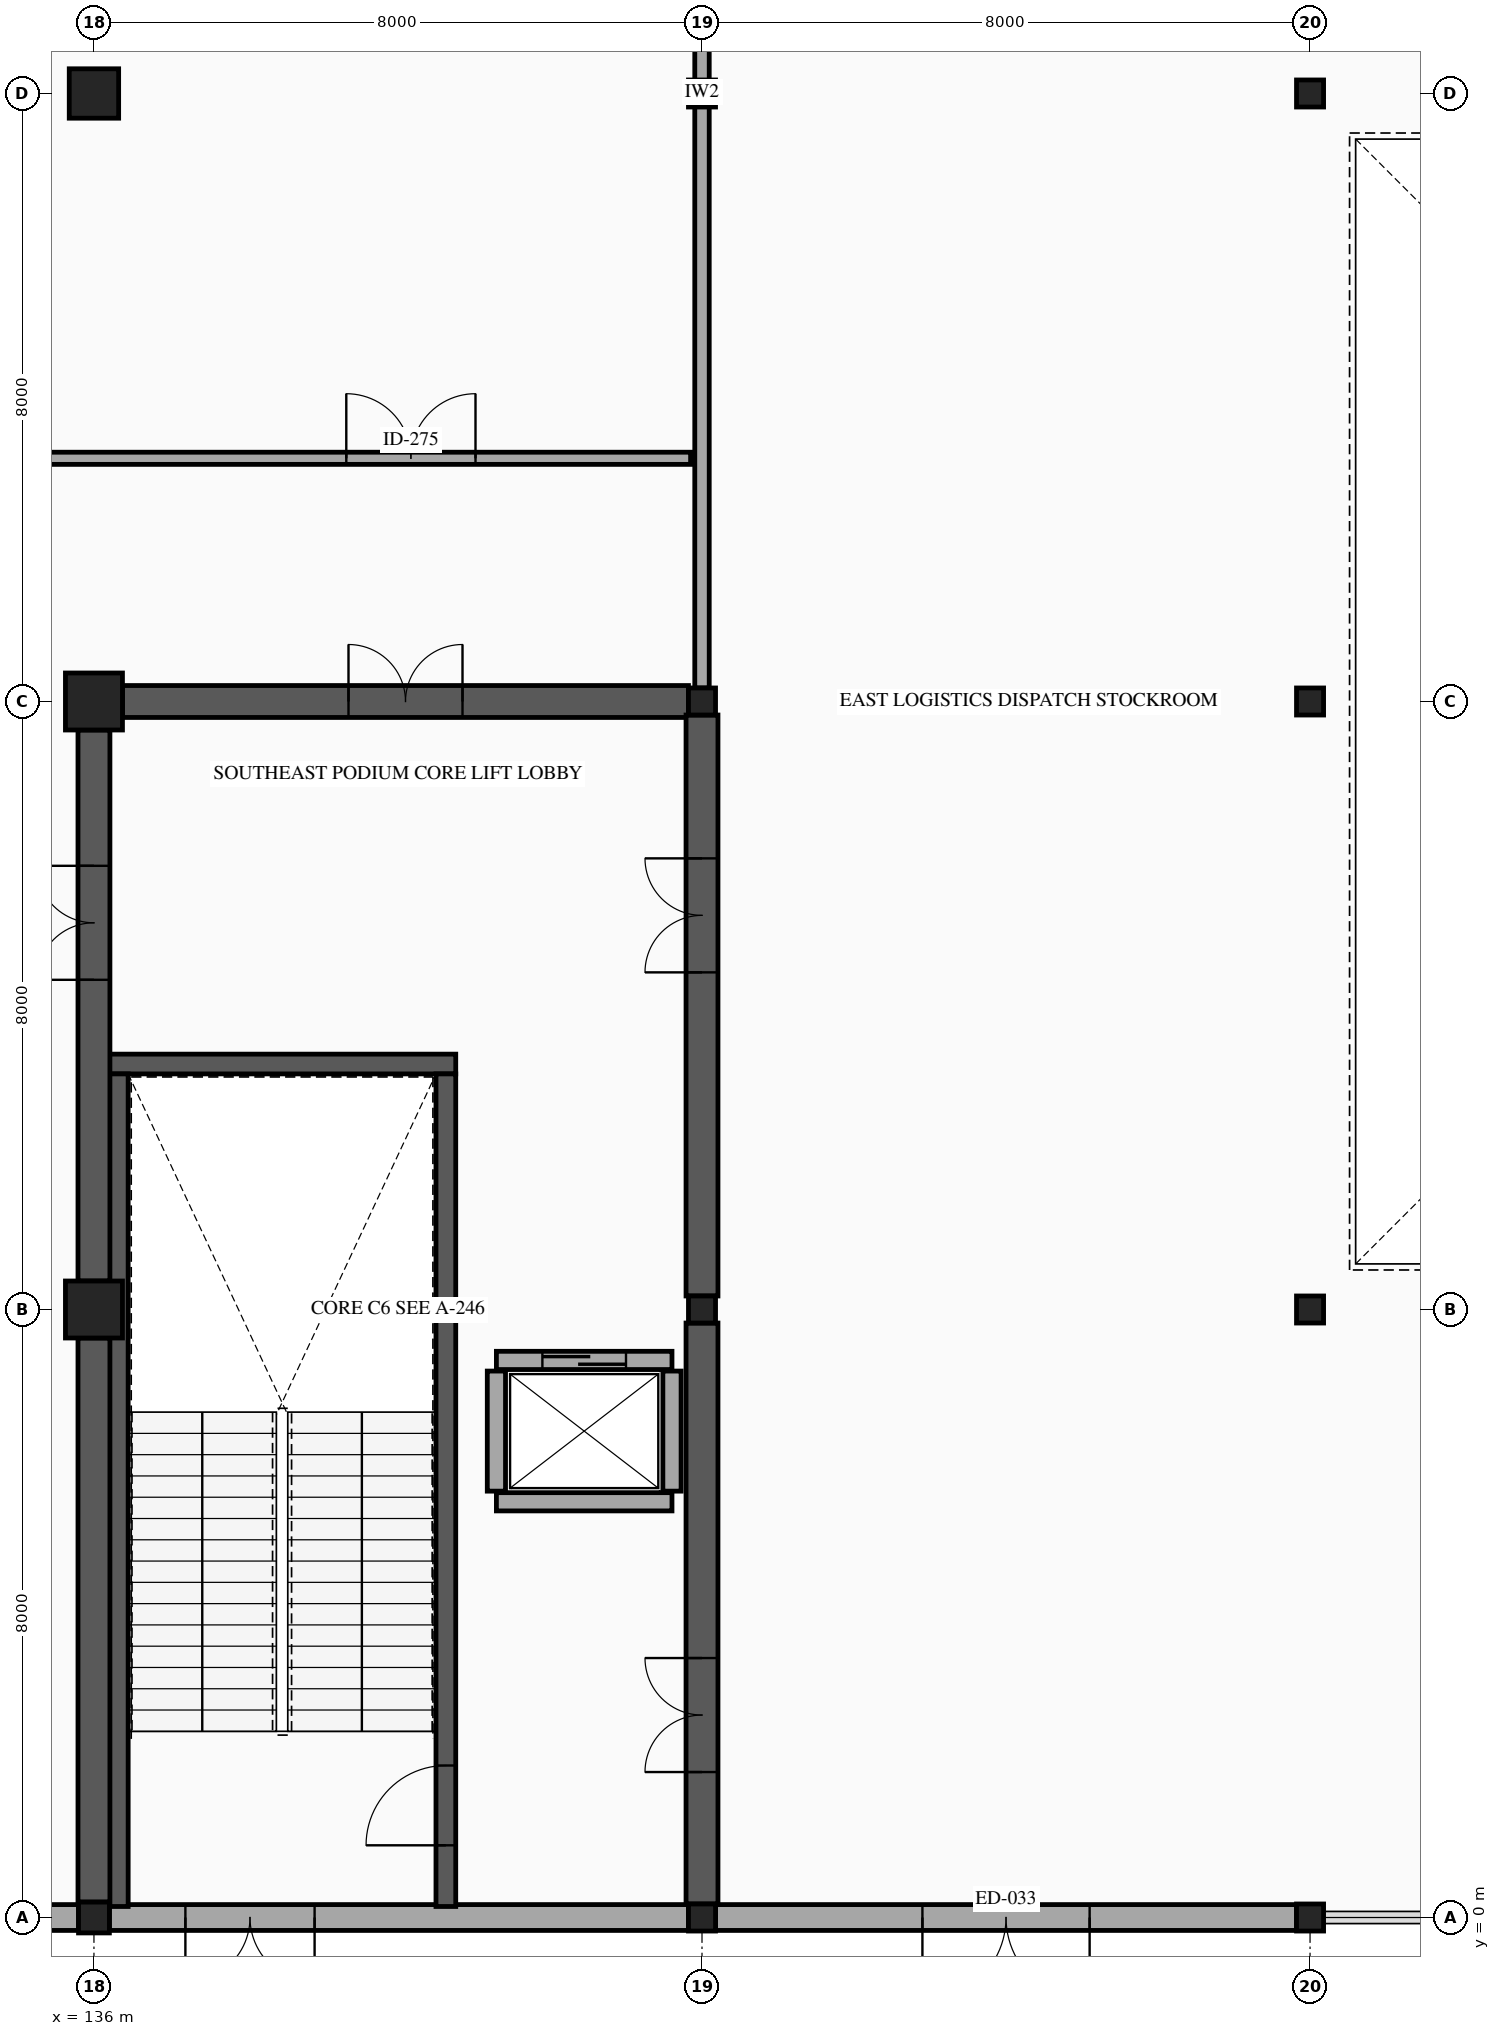
"""IFC4 building model, lengths in metres.
Left out: names, types, materials, properties, quantities, classifications, styles, units other than length and angle.
Written with IfcOpenShell. Run it as: python <this file> out.ifc"""

import sys

from ifc_helpers import new_model, si_unit, direction, frame, frame_2d, origin, origin_2d, place, context, subcontext, project, spatial, rectangle, hollow_rectangle, extrude, element, fill, save


model = new_model("IFC4")
c1 = context("Model", 3, precision=1e-05, world=origin(), true_north=direction((0.0, 1.0)))
c2 = subcontext(c1, "Body", "Model", "MODEL_VIEW")
j1 = project(units=[si_unit("LENGTHUNIT", "METRE"), si_unit("PLANEANGLEUNIT", "RADIAN")], contexts=[c1])
p1 = place(None, origin())
s1 = spatial("IfcSite", under=j1, at=p1, CompositionType="ELEMENT")
p2 = place(p1, origin())
s2 = spatial("IfcBuilding", under=s1, at=p2, CompositionType="ELEMENT")
p3 = place(p2, origin())
s3 = spatial("IfcBuildingStorey", under=s2, at=p3, CompositionType="ELEMENT", Elevation=0.0)
p4 = place(p3, frame((136.0, 0.0, 0.0), z_axis=(0.0, 0.0, 1.0), x_axis=(1.0, 0.0, 0.0)))
e1 = element("IfcColumn", 1, at=p4, inside=s3, PredefinedType="COLUMN", context=c2, shape_type="SweptSolid", body=[
    extrude(hollow_rectangle(XDim=0.406, YDim=0.406, WallThickness=0.015, InnerFilletRadius=0.015, OuterFilletRadius=0.029, at=origin_2d()), origin(), (0.0, 0.0, 1.0), 5.6),
])
for number, where, z_axis, x_axis in (
    (2, (136.0, 8.0, 0.0), (0.0, 0.0, 1.0), (1.0, 0.0, 0.0)),
    (3, (136.0, 16.0, 0.0), (0.0, 0.0, 1.0), (1.0, 0.0, 0.0)),
):
    element("IfcColumn", number, at=place(p3, frame(where, z_axis=z_axis, x_axis=x_axis)), inside=s3, PredefinedType="COLUMN", context=c2, shape_type="SweptSolid", body=[
        extrude(rectangle(XDim=0.75, YDim=0.75, at=origin_2d()), origin(), (0.0, 0.0, 1.0), 5.6),
    ])
p5 = place(p3, frame((136.0, 24.0, 0.0), z_axis=(0.0, 0.0, 1.0), x_axis=(1.0, 0.0, 0.0)))
e4 = element("IfcColumn", 4, at=p5, inside=s3, PredefinedType="COLUMN", context=c2, shape_type="SweptSolid", body=[
    extrude(rectangle(XDim=0.65, YDim=0.65, at=origin_2d()), origin(), (0.0, 0.0, 1.0), 5.6),
])
for number, where, z_axis, x_axis in (
    (5, (144.0, 0.0, 0.0), (0.0, 0.0, 1.0), (1.0, 0.0, 0.0)),
    (6, (144.0, 8.0, 0.0), (0.0, 0.0, 1.0), (1.0, 0.0, 0.0)),
    (7, (144.0, 16.0, 0.0), (0.0, 0.0, 1.0), (1.0, 0.0, 0.0)),
    (8, (144.0, 24.0, 0.0), (0.0, 0.0, 1.0), (1.0, 0.0, 0.0)),
    (9, (152.0, 0.0, 0.0), (0.0, 0.0, 1.0), (1.0, 0.0, 0.0)),
    (10, (152.0, 8.0, 0.0), (0.0, 0.0, 1.0), (1.0, 0.0, 0.0)),
    (11, (152.0, 16.0, 0.0), (0.0, 0.0, 1.0), (1.0, 0.0, 0.0)),
    (12, (152.0, 24.0, 0.0), (0.0, 0.0, 1.0), (1.0, 0.0, 0.0)),
):
    element("IfcColumn", number, at=place(p3, frame(where, z_axis=z_axis, x_axis=x_axis)), inside=s3, PredefinedType="COLUMN", context=c2, shape_type="SweptSolid", body=[
        extrude(hollow_rectangle(XDim=0.356, YDim=0.356, WallThickness=0.012, InnerFilletRadius=0.012, OuterFilletRadius=0.024, at=origin_2d()), origin(), (0.0, 0.0, 1.0), 5.6),
    ])
p6 = place(p3, frame((151.822, 0.0, 0.0), z_axis=(0.0, 0.0, 1.0), x_axis=(-1.0, 0.0, 0.0)))
e13 = element("IfcWall", 13, at=p6, inside=s3, PredefinedType="STANDARD", context=c2, shape_type="SweptSolid", body=[
    extrude(rectangle(XDim=7.644, YDim=0.34, at=frame_2d((3.822, 0.0))), origin(), (0.0, 0.0, 1.0), 4.58),
])
p7 = place(p6, frame((2.722, 0.0, 0.0)))
e14 = element("IfcOpeningElement", 14, at=p7, cuts=e13, PredefinedType="OPENING", context=c2, shape_type="SweptSolid", body=[
    extrude(rectangle(XDim=2.2, YDim=2.45, at=frame_2d((1.1, 1.225))), frame((0.0, 0.18, 0.0), z_axis=(0.0, -1.0, 0.0), x_axis=(1.0, 0.0, 0.0)), (0.0, 0.0, 1.0), 0.36),
])
p8 = place(p3, frame((143.822, 0.0, 0.0), z_axis=(0.0, 0.0, 1.0), x_axis=(-1.0, 0.0, 0.0)))
e15 = element("IfcWall", 15, at=p8, inside=s3, PredefinedType="STANDARD", context=c2, shape_type="SweptSolid", body=[
    extrude(rectangle(XDim=7.619, YDim=0.34, at=frame_2d((3.81, 0.0))), origin(), (0.0, 0.0, 1.0), 4.58),
])
p9 = place(p8, frame((4.919, 0.0, 0.0)))
e16 = element("IfcOpeningElement", 16, at=p9, cuts=e15, PredefinedType="OPENING", context=c2, shape_type="SweptSolid", body=[
    extrude(rectangle(XDim=1.7, YDim=2.15, at=frame_2d((0.85, 1.075))), frame((0.0, 0.18, 0.0), z_axis=(0.0, -1.0, 0.0), x_axis=(1.0, 0.0, 0.0)), (0.0, 0.0, 1.0), 0.36),
])
p10 = place(p3, frame((135.797, 0.0, 0.0), z_axis=(0.0, 0.0, 1.0), x_axis=(-1.0, 0.0, 0.0)))
e17 = element("IfcWall", 17, at=p10, inside=s3, PredefinedType="STANDARD", context=c2, shape_type="SweptSolid", body=[
    extrude(rectangle(XDim=7.594, YDim=0.34, at=frame_2d((3.797, 0.0))), origin(), (0.0, 0.0, 1.0), 4.58),
])
p11 = place(p10, frame((2.897, 0.0, 0.0)))
e18 = element("IfcOpeningElement", 18, at=p11, cuts=e17, PredefinedType="OPENING", context=c2, shape_type="SweptSolid", body=[
    extrude(rectangle(XDim=1.8, YDim=2.3, at=frame_2d((0.9, 1.15))), frame((0.0, 0.18, 0.0), z_axis=(0.0, -1.0, 0.0), x_axis=(1.0, 0.0, 0.0)), (0.0, 0.0, 1.0), 0.36),
])
p12 = place(p3, frame((136.19, 11.23, 0.0), z_axis=(0.0, 0.0, 1.0), x_axis=(1.0, 0.0, 0.0)))
e19 = element("IfcWall", 19, at=p12, inside=s3, PredefinedType="SHEAR", context=c2, shape_type="SweptSolid", body=[
    extrude(rectangle(XDim=4.57, YDim=0.26, at=frame_2d((2.285, 0.0))), origin(), (0.0, 0.0, 1.0), 5.38),
])
p13 = place(p3, frame((136.32, 0.145, 0.0), z_axis=(0.0, 0.0, 1.0), x_axis=(0.0, 1.0, 0.0)))
e20 = element("IfcWall", 20, at=p13, inside=s3, PredefinedType="SHEAR", context=c2, shape_type="SweptSolid", body=[
    extrude(rectangle(XDim=10.955, YDim=0.26, at=frame_2d((5.478, 0.0))), origin(), (0.0, 0.0, 1.0), 5.38),
])
p14 = place(p3, frame((140.63, 0.145, 0.0), z_axis=(0.0, 0.0, 1.0), x_axis=(0.0, 1.0, 0.0)))
e21 = element("IfcWall", 21, at=p14, inside=s3, PredefinedType="SHEAR", context=c2, shape_type="SweptSolid", body=[
    extrude(rectangle(XDim=10.955, YDim=0.26, at=frame_2d((5.478, 0.0))), origin(), (0.0, 0.0, 1.0), 5.38),
])
p15 = place(p14, frame((0.805, 0.0, 0.0)))
e22 = element("IfcOpeningElement", 22, at=p15, cuts=e21, PredefinedType="OPENING", context=c2, shape_type="SweptSolid", body=[
    extrude(rectangle(XDim=1.05, YDim=2.15, at=frame_2d((0.525, 1.075))), frame((0.0, 0.14, 0.0), z_axis=(0.0, -1.0, 0.0), x_axis=(1.0, 0.0, 0.0)), (0.0, 0.0, 1.0), 0.28),
])
p16 = place(p3, frame((136.375, 16.0, 0.0), z_axis=(0.0, 0.0, 1.0), x_axis=(1.0, 0.0, 0.0)))
e23 = element("IfcWall", 23, at=p16, inside=s3, PredefinedType="SHEAR", context=c2, shape_type="SweptSolid", body=[
    extrude(rectangle(XDim=7.447, YDim=0.42, at=frame_2d((3.724, 0.0))), origin(), (0.0, 0.0, 1.0), 5.38),
])
p17 = place(p16, frame((2.974, 0.0, 0.0)))
e24 = element("IfcOpeningElement", 24, at=p17, cuts=e23, PredefinedType="OPENING", context=c2, shape_type="SweptSolid", body=[
    extrude(rectangle(XDim=1.5, YDim=2.15, at=frame_2d((0.75, 1.075))), frame((0.0, 0.22, 0.0), z_axis=(0.0, -1.0, 0.0), x_axis=(1.0, 0.0, 0.0)), (0.0, 0.0, 1.0), 0.44),
])
p18 = place(p3, frame((136.0, 0.203, 0.0), z_axis=(0.0, 0.0, 1.0), x_axis=(0.0, 1.0, 0.0)))
e25 = element("IfcWall", 25, at=p18, inside=s3, PredefinedType="SHEAR", context=c2, shape_type="SweptSolid", body=[
    extrude(rectangle(XDim=7.422, YDim=0.42, at=frame_2d((3.711, 0.0))), origin(), (0.0, 0.0, 1.0), 5.38),
])
p19 = place(p3, frame((136.0, 8.375, 0.0), z_axis=(0.0, 0.0, 1.0), x_axis=(0.0, 1.0, 0.0)))
e26 = element("IfcWall", 26, at=p19, inside=s3, PredefinedType="SHEAR", context=c2, shape_type="SweptSolid", body=[
    extrude(rectangle(XDim=7.25, YDim=0.42, at=frame_2d((3.625, 0.0))), origin(), (0.0, 0.0, 1.0), 5.38),
])
p20 = place(p19, frame((3.963, 0.0, 0.0)))
e27 = element("IfcOpeningElement", 27, at=p20, cuts=e26, PredefinedType="OPENING", context=c2, shape_type="SweptSolid", body=[
    extrude(rectangle(XDim=1.5, YDim=2.15, at=frame_2d((0.75, 1.075))), frame((0.0, 0.22, 0.0), z_axis=(0.0, -1.0, 0.0), x_axis=(1.0, 0.0, 0.0)), (0.0, 0.0, 1.0), 0.44),
])
p21 = place(p3, frame((144.0, 0.178, 0.0), z_axis=(0.0, 0.0, 1.0), x_axis=(0.0, 1.0, 0.0)))
e28 = element("IfcWall", 28, at=p21, inside=s3, PredefinedType="SHEAR", context=c2, shape_type="SweptSolid", body=[
    extrude(rectangle(XDim=7.644, YDim=0.42, at=frame_2d((3.822, 0.0))), origin(), (0.0, 0.0, 1.0), 5.38),
])
p22 = place(p21, frame((1.736, 0.0, 0.0)))
e29 = element("IfcOpeningElement", 29, at=p22, cuts=e28, PredefinedType="OPENING", context=c2, shape_type="SweptSolid", body=[
    extrude(rectangle(XDim=1.5, YDim=2.15, at=frame_2d((0.75, 1.075))), frame((0.0, 0.22, 0.0), z_axis=(0.0, -1.0, 0.0), x_axis=(1.0, 0.0, 0.0)), (0.0, 0.0, 1.0), 0.44),
])
p23 = place(p3, frame((144.0, 8.178, 0.0), z_axis=(0.0, 0.0, 1.0), x_axis=(0.0, 1.0, 0.0)))
e30 = element("IfcWall", 30, at=p23, inside=s3, PredefinedType="SHEAR", context=c2, shape_type="SweptSolid", body=[
    extrude(rectangle(XDim=7.644, YDim=0.42, at=frame_2d((3.822, 0.0))), origin(), (0.0, 0.0, 1.0), 5.38),
])
p24 = place(p23, frame((4.258, 0.0, 0.0)))
e31 = element("IfcOpeningElement", 31, at=p24, cuts=e30, PredefinedType="OPENING", context=c2, shape_type="SweptSolid", body=[
    extrude(rectangle(XDim=1.5, YDim=2.15, at=frame_2d((0.75, 1.075))), frame((0.0, 0.22, 0.0), z_axis=(0.0, -1.0, 0.0), x_axis=(1.0, 0.0, 0.0)), (0.0, 0.0, 1.0), 0.44),
])
p25 = place(p3, frame((141.295, 7.33, 0.0), z_axis=(0.0, 0.0, 1.0), x_axis=(1.0, 0.0, 0.0)))
e32 = element("IfcWall", 32, at=p25, inside=s3, PredefinedType="PARTITIONING", context=c2, shape_type="SweptSolid", body=[
    extrude(rectangle(XDim=2.31, YDim=0.24, at=frame_2d((1.155, 0.0))), origin(), (0.0, 0.0, 1.0), 5.38),
])
p26 = place(p25, frame((0.605, 0.0, 0.0)))
e33 = element("IfcOpeningElement", 33, at=p26, cuts=e32, PredefinedType="OPENING", context=c2, shape_type="SweptSolid", body=[
    extrude(rectangle(XDim=1.1, YDim=2.15, at=frame_2d((0.55, 1.075))), frame((0.0, 0.13, 0.0), z_axis=(0.0, -1.0, 0.0), x_axis=(1.0, 0.0, 0.0)), (0.0, 0.0, 1.0), 0.26),
])
p27 = place(p3, frame((141.295, 5.47, 0.0), z_axis=(0.0, 0.0, 1.0), x_axis=(1.0, 0.0, 0.0)))
e34 = element("IfcWall", 34, at=p27, inside=s3, PredefinedType="PARTITIONING", context=c2, shape_type="SweptSolid", body=[
    extrude(rectangle(XDim=2.31, YDim=0.24, at=frame_2d((1.155, 0.0))), origin(), (0.0, 0.0, 1.0), 5.38),
])
for number, where, z_axis, x_axis in (
    (35, (141.295, 5.61, 0.0), (0.0, 0.0, 1.0), (0.0, 1.0, 0.0)),
    (36, (143.605, 5.61, 0.0), (0.0, 0.0, 1.0), (0.0, 1.0, 0.0)),
):
    element("IfcWall", number, at=place(p3, frame(where, z_axis=z_axis, x_axis=x_axis)), inside=s3, PredefinedType="PARTITIONING", context=c2, shape_type="SweptSolid", body=[
        extrude(rectangle(XDim=1.58, YDim=0.24, at=frame_2d((0.79, 0.0))), origin(), (0.0, 0.0, 1.0), 5.38),
    ])
p28 = place(p3, frame((124.4, 19.2, 0.0), z_axis=(0.0, 0.0, 1.0), x_axis=(1.0, 0.0, 0.0)))
e37 = element("IfcWall", 37, at=p28, inside=s3, PredefinedType="PARTITIONING", context=c2, shape_type="SweptSolid", body=[
    extrude(rectangle(XDim=19.45, YDim=0.16, at=frame_2d((9.725, 0.0))), origin(), (0.0, 0.0, 1.0), 4.58),
])
p29 = place(p28, frame((14.92, 0.0, 0.0)))
e38 = element("IfcOpeningElement", 38, at=p29, cuts=e37, PredefinedType="OPENING", context=c2, shape_type="SweptSolid", body=[
    extrude(rectangle(XDim=1.7, YDim=2.25, at=frame_2d((0.85, 1.125))), frame((0.0, 0.09, 0.0), z_axis=(0.0, -1.0, 0.0), x_axis=(1.0, 0.0, 0.0)), (0.0, 0.0, 1.0), 0.18),
])
p30 = place(p3, frame((144.0, 16.178, 0.0), z_axis=(0.0, 0.0, 1.0), x_axis=(0.0, 1.0, 0.0)))
e39 = element("IfcWall", 39, at=p30, inside=s3, PredefinedType="PARTITIONING", context=c2, shape_type="SweptSolid", body=[
    extrude(rectangle(XDim=15.672, YDim=0.19, at=frame_2d((7.836, 0.0))), origin(), (0.0, 0.0, 1.0), 4.58),
])
p31 = place(p30, frame((10.828, 0.0, 0.0)))
e40 = element("IfcOpeningElement", 40, at=p31, cuts=e39, PredefinedType="OPENING", context=c2, shape_type="SweptSolid", body=[
    extrude(rectangle(XDim=1.8, YDim=2.25, at=frame_2d((0.9, 1.125))), frame((0.0, 0.105, 0.0), z_axis=(0.0, -1.0, 0.0), x_axis=(1.0, 0.0, 0.0)), (0.0, 0.0, 1.0), 0.21),
])
p32 = place(p7, origin())
e41 = element("IfcDoor", 41, at=p32, inside=s3, OperationType="DOUBLE_DOOR_SINGLE_SWING", PredefinedType="DOOR", context=c2, shape_type="SweptSolid", body=[
    extrude(rectangle(XDim=2.2, YDim=2.45, at=frame_2d((1.1, 1.225))), frame((0.0, 0.025, 0.0), z_axis=(0.0, -1.0, 0.0), x_axis=(1.0, 0.0, 0.0)), (0.0, 0.0, 1.0), 0.05),
])
fill(e14, e41)
p33 = place(p9, origin())
e42 = element("IfcDoor", 42, at=p33, inside=s3, OperationType="DOUBLE_DOOR_SINGLE_SWING", PredefinedType="DOOR", context=c2, shape_type="SweptSolid", body=[
    extrude(rectangle(XDim=1.7, YDim=2.15, at=frame_2d((0.85, 1.075))), frame((0.0, 0.025, 0.0), z_axis=(0.0, -1.0, 0.0), x_axis=(1.0, 0.0, 0.0)), (0.0, 0.0, 1.0), 0.05),
])
fill(e16, e42)
p34 = place(p15, origin())
e43 = element("IfcDoor", 43, at=p34, inside=s3, OperationType="SINGLE_SWING_LEFT", PredefinedType="DOOR", context=c2, shape_type="SweptSolid", body=[
    extrude(rectangle(XDim=1.05, YDim=2.15, at=frame_2d((0.525, 1.075))), frame((0.0, 0.025, 0.0), z_axis=(0.0, -1.0, 0.0), x_axis=(1.0, 0.0, 0.0)), (0.0, 0.0, 1.0), 0.05),
])
fill(e22, e43)
p35 = place(p17, origin())
e44 = element("IfcDoor", 44, at=p35, inside=s3, OperationType="DOUBLE_DOOR_SINGLE_SWING", PredefinedType="DOOR", context=c2, shape_type="SweptSolid", body=[
    extrude(rectangle(XDim=1.5, YDim=2.15, at=frame_2d((0.75, 1.075))), frame((0.0, 0.025, 0.0), z_axis=(0.0, -1.0, 0.0), x_axis=(1.0, 0.0, 0.0)), (0.0, 0.0, 1.0), 0.05),
])
fill(e24, e44)
p36 = place(p20, origin())
e45 = element("IfcDoor", 45, at=p36, inside=s3, OperationType="DOUBLE_DOOR_SINGLE_SWING", PredefinedType="DOOR", context=c2, shape_type="SweptSolid", body=[
    extrude(rectangle(XDim=1.5, YDim=2.15, at=frame_2d((0.75, 1.075))), frame((0.0, 0.025, 0.0), z_axis=(0.0, -1.0, 0.0), x_axis=(1.0, 0.0, 0.0)), (0.0, 0.0, 1.0), 0.05),
])
fill(e27, e45)
p37 = place(p22, origin())
e46 = element("IfcDoor", 46, at=p37, inside=s3, OperationType="DOUBLE_DOOR_SINGLE_SWING", PredefinedType="DOOR", context=c2, shape_type="SweptSolid", body=[
    extrude(rectangle(XDim=1.5, YDim=2.15, at=frame_2d((0.75, 1.075))), frame((0.0, 0.025, 0.0), z_axis=(0.0, -1.0, 0.0), x_axis=(1.0, 0.0, 0.0)), (0.0, 0.0, 1.0), 0.05),
])
fill(e29, e46)
p38 = place(p24, origin())
e47 = element("IfcDoor", 47, at=p38, inside=s3, OperationType="DOUBLE_DOOR_SINGLE_SWING", PredefinedType="DOOR", context=c2, shape_type="SweptSolid", body=[
    extrude(rectangle(XDim=1.5, YDim=2.15, at=frame_2d((0.75, 1.075))), frame((0.0, 0.025, 0.0), z_axis=(0.0, -1.0, 0.0), x_axis=(1.0, 0.0, 0.0)), (0.0, 0.0, 1.0), 0.05),
])
fill(e31, e47)
p39 = place(p26, origin())
e48 = element("IfcDoor", 48, at=p39, inside=s3, OperationType="SLIDING_TO_LEFT", PredefinedType="DOOR", context=c2, shape_type="SweptSolid", body=[
    extrude(rectangle(XDim=1.1, YDim=2.15, at=frame_2d((0.55, 1.075))), frame((0.0, 0.025, 0.0), z_axis=(0.0, -1.0, 0.0), x_axis=(1.0, 0.0, 0.0)), (0.0, 0.0, 1.0), 0.05),
])
fill(e33, e48)
p40 = place(p29, origin())
e49 = element("IfcDoor", 49, at=p40, inside=s3, OperationType="DOUBLE_DOOR_SINGLE_SWING", PredefinedType="DOOR", context=c2, shape_type="SweptSolid", body=[
    extrude(rectangle(XDim=1.7, YDim=2.25, at=frame_2d((0.85, 1.125))), frame((0.0, 0.025, 0.0), z_axis=(0.0, -1.0, 0.0), x_axis=(1.0, 0.0, 0.0)), (0.0, 0.0, 1.0), 0.05),
])
fill(e38, e49)
save(model, sys.argv[1])
